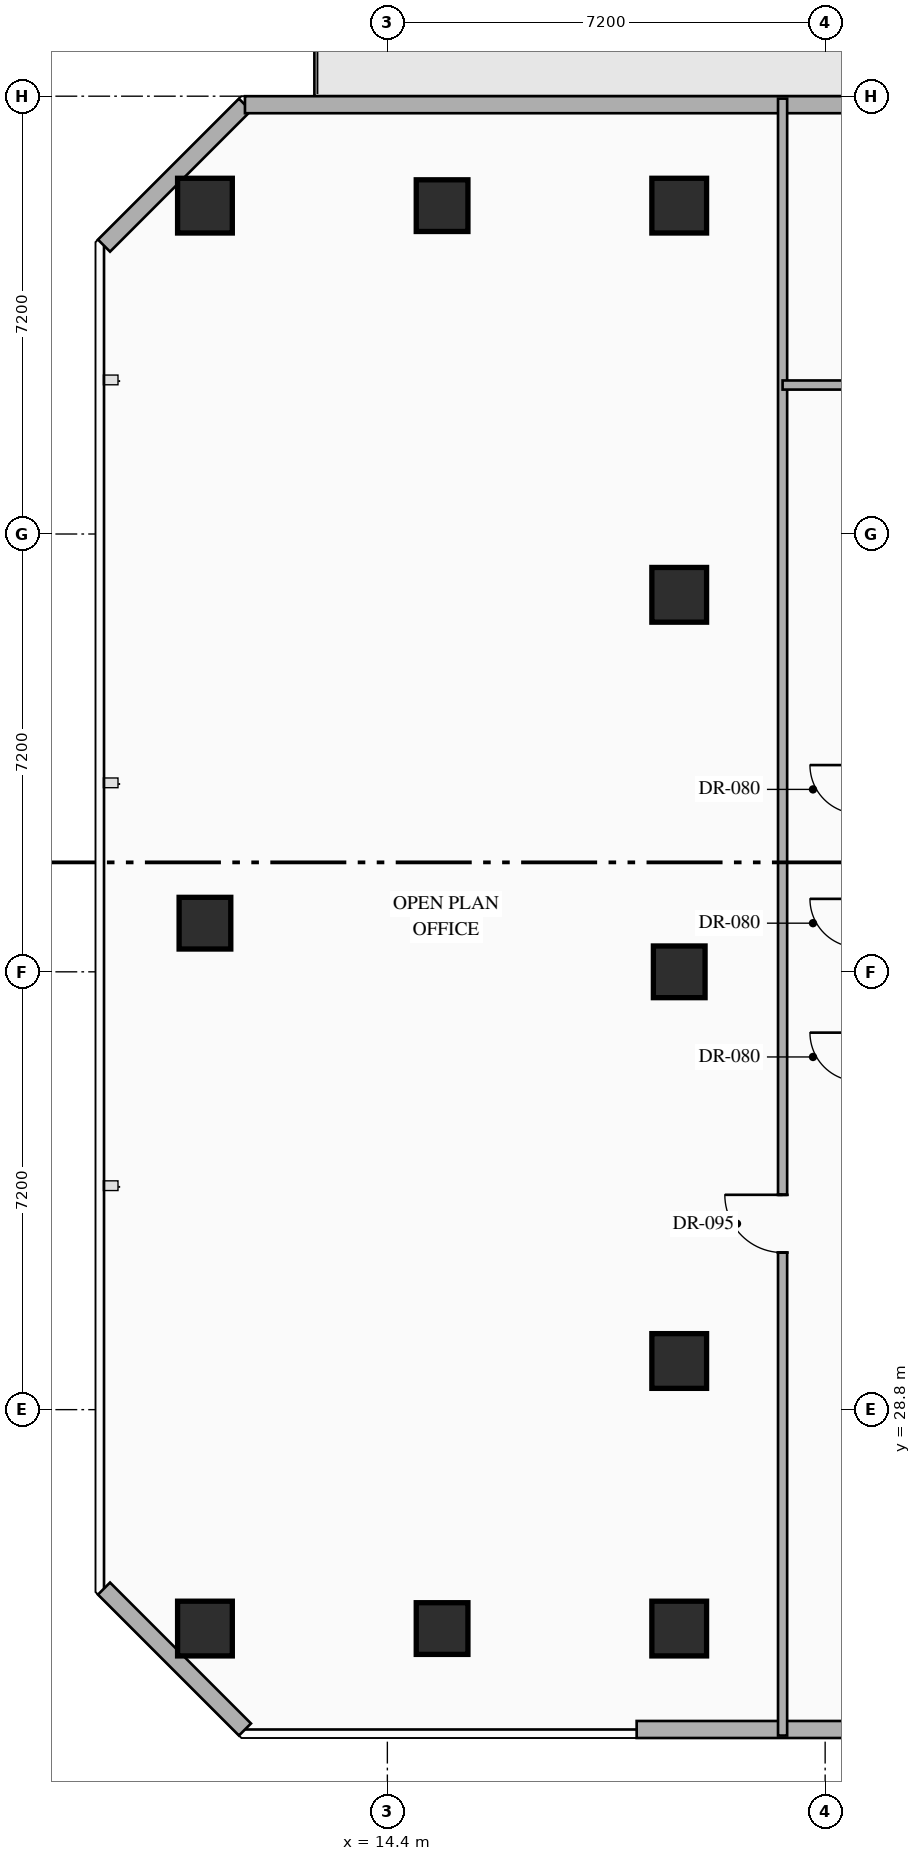
"""IFC4 building model, lengths in metres.
Left out: names, types, materials, properties, quantities, classifications, styles, units other than length and angle.
Written with IfcOpenShell. Run it as: python <this file> out.ifc"""

import sys

from ifc_helpers import new_model, si_unit, direction, frame, frame_2d, origin, origin_2d, place, context, subcontext, project, spatial, rectangle, hollow_rectangle, extrude, element, fill, save


model = new_model("IFC4")
c1 = context("Model", 3, precision=1e-05, world=origin(), true_north=direction((0.0, 1.0)))
c2 = subcontext(c1, "Body", "Model", "MODEL_VIEW")
j1 = project(units=[si_unit("LENGTHUNIT", "METRE"), si_unit("PLANEANGLEUNIT", "RADIAN")], contexts=[c1])
p1 = place(None, origin())
s1 = spatial("IfcSite", under=j1, at=p1, CompositionType="ELEMENT")
p2 = place(p1, origin())
s2 = spatial("IfcBuilding", under=s1, at=p2, CompositionType="ELEMENT")
p3 = place(p2, frame((0.0, 0.0, 115.65)))
s3 = spatial("IfcBuildingStorey", under=s2, at=p3, CompositionType="ELEMENT", Elevation=115.65)
for number, where, z_axis, x_axis in (
    (1, (11.4, 25.2, 0.0), (0.0, 0.0, 1.0), (1.0, 0.0, 0.0)),
    (2, (11.4, 48.6, 0.0), (0.0, 0.0, 1.0), (1.0, 0.0, 0.0)),
    (3, (19.2, 48.6, 0.0), (0.0, 0.0, 1.0), (1.0, 0.0, 0.0)),
    (4, (19.2, 25.2, 0.0), (0.0, 0.0, 1.0), (1.0, 0.0, 0.0)),
    (5, (19.2, 29.6, 0.0), (0.0, 0.0, 1.0), (1.0, 0.0, 0.0)),
    (6, (19.2, 42.2, 0.0), (0.0, 0.0, 1.0), (1.0, 0.0, 0.0)),
):
    element("IfcColumn", number, at=place(p3, frame(where, z_axis=z_axis, x_axis=x_axis)), inside=s3, PredefinedType="COLUMN", context=c2, shape_type="SweptSolid", body=[
        extrude(hollow_rectangle(XDim=0.9, YDim=0.9, WallThickness=0.036, at=origin_2d()), origin(), (0.0, 0.0, 1.0), 3.6),
    ])
for number, where, z_axis, x_axis in (
    (7, (11.4, 36.8, 0.0), (0.0, 0.0, 1.0), (1.0, 0.0, 0.0)),
    (8, (19.2, 36.0, 0.0), (0.0, 0.0, 1.0), (1.0, 0.0, 0.0)),
    (9, (15.3, 25.2, 0.0), (0.0, 0.0, 1.0), (1.0, 0.0, 0.0)),
    (10, (15.3, 48.6, 0.0), (0.0, 0.0, 1.0), (1.0, 0.0, 0.0)),
):
    element("IfcColumn", number, at=place(p3, frame(where, z_axis=z_axis, x_axis=x_axis)), inside=s3, PredefinedType="COLUMN", context=c2, shape_type="SweptSolid", body=[
        extrude(hollow_rectangle(XDim=0.85, YDim=0.85, WallThickness=0.032, at=origin_2d()), origin(), (0.0, 0.0, 1.0), 3.6),
    ])
p4 = place(p3, frame((25.247, 23.54, 0.0), z_axis=(0.0, 0.0, 1.0), x_axis=(-1.0, 0.0, 0.0)))
e11 = element("IfcWall", 11, at=p4, inside=s3, PredefinedType="STANDARD", context=c2, shape_type="SweptSolid", body=[
    extrude(rectangle(XDim=6.747, YDim=0.28, at=frame_2d((3.374, 0.0))), origin(), (0.0, 0.0, 1.0), 3.35),
])
p5 = place(p3, frame((12.058, 23.54, 0.0), z_axis=(0.0, 0.0, 1.0), x_axis=(-0.707144017911, 0.707069542501, 0.0)))
e12 = element("IfcWall", 12, at=p5, inside=s3, PredefinedType="STANDARD", context=c2, shape_type="SweptSolid", body=[
    extrude(rectangle(XDim=3.278, YDim=0.28, at=frame_2d((1.639, 0.0))), origin(), (0.0, 0.0, 1.0), 3.35),
])
p6 = place(p3, frame((9.74, 47.942, 0.0), z_axis=(0.0, 0.0, 1.0), x_axis=(0.707106781187, 0.707106781187, 0.0)))
e13 = element("IfcWall", 13, at=p6, inside=s3, PredefinedType="STANDARD", context=c2, shape_type="SweptSolid", body=[
    extrude(rectangle(XDim=3.278, YDim=0.28, at=frame_2d((1.639, 0.0))), origin(), (0.0, 0.0, 1.0), 3.35),
])
p7 = place(p3, frame((12.058, 50.26, 0.0), z_axis=(0.0, 0.0, 1.0), x_axis=(1.0, 0.0, 0.0)))
e14 = element("IfcWall", 14, at=p7, inside=s3, PredefinedType="STANDARD", context=c2, shape_type="SweptSolid", body=[
    extrude(rectangle(XDim=30.484, YDim=0.28, at=frame_2d((15.242, 0.0))), origin(), (0.0, 0.0, 1.0), 3.35),
])
p8 = place(p7, frame((14.992, 0.0, 0.0)))
e15 = element("IfcOpeningElement", 15, at=p8, cuts=e14, PredefinedType="OPENING", context=c2, shape_type="SweptSolid", body=[
    extrude(rectangle(XDim=1.1, YDim=2.2, at=frame_2d((0.55, 1.1))), frame((0.0, 0.15, 0.0), z_axis=(0.0, -1.0, 0.0), x_axis=(1.0, 0.0, 0.0)), (0.0, 0.0, 1.0), 0.3),
])
p9 = place(p7, frame((10.074, 0.0, 0.85)))
e16 = element("IfcOpeningElement", 16, at=p9, cuts=e14, PredefinedType="OPENING", context=c2, shape_type="SweptSolid", body=[
    extrude(rectangle(XDim=1.8, YDim=2.1, at=frame_2d((0.9, 1.05))), frame((0.0, 0.15, 0.0), z_axis=(0.0, -1.0, 0.0), x_axis=(1.0, 0.0, 0.0)), (0.0, 0.0, 1.0), 0.3),
])
p10 = place(p3, frame((20.9, 23.44, 0.0), z_axis=(0.0, 0.0, 1.0), x_axis=(0.0, 1.0, 0.0)))
e17 = element("IfcWall", 17, at=p10, inside=s3, PredefinedType="PARTITIONING", context=c2, shape_type="SweptSolid", body=[
    extrude(rectangle(XDim=26.92, YDim=0.15, at=frame_2d((13.46, 0.0))), origin(), (0.0, 0.0, 1.0), 3.35),
])
p11 = place(p10, frame((7.943, 0.0, 0.0)))
e18 = element("IfcOpeningElement", 18, at=p11, cuts=e17, PredefinedType="OPENING", context=c2, shape_type="SweptSolid", body=[
    extrude(rectangle(XDim=0.95, YDim=2.15, at=frame_2d((0.475, 1.075))), frame((0.0, 0.085, 0.0), z_axis=(0.0, -1.0, 0.0), x_axis=(1.0, 0.0, 0.0)), (0.0, 0.0, 1.0), 0.17),
])
p12 = place(p3, frame((20.9, 45.65, 0.0), z_axis=(0.0, 0.0, 1.0), x_axis=(1.0, 0.0, 0.0)))
e19 = element("IfcWall", 19, at=p12, inside=s3, PredefinedType="PARTITIONING", context=c2, shape_type="SweptSolid", body=[
    extrude(rectangle(XDim=24.06, YDim=0.15, at=frame_2d((12.03, 0.0))), origin(), (0.0, 0.0, 1.0), 2.695),
])
p13 = place(p12, frame((9.32, 0.0, 0.0)))
e20 = element("IfcOpeningElement", 20, at=p13, cuts=e19, PredefinedType="OPENING", context=c2, shape_type="SweptSolid", body=[
    extrude(rectangle(XDim=0.95, YDim=2.15, at=frame_2d((0.475, 1.075))), frame((0.0, 0.085, 0.0), z_axis=(0.0, -1.0, 0.0), x_axis=(1.0, 0.0, 0.0)), (0.0, 0.0, 1.0), 0.17),
])
p14 = place(p11, origin())
e21 = element("IfcDoor", 21, at=p14, inside=s3, OperationType="SINGLE_SWING_RIGHT", PredefinedType="DOOR", context=c2, shape_type="SweptSolid", body=[
    extrude(rectangle(XDim=0.95, YDim=2.15, at=frame_2d((0.475, 1.075))), frame((0.0, 0.025, 0.0), z_axis=(0.0, -1.0, 0.0), x_axis=(1.0, 0.0, 0.0)), (0.0, 0.0, 1.0), 0.05),
])
fill(e18, e21)
save(model, sys.argv[1])
